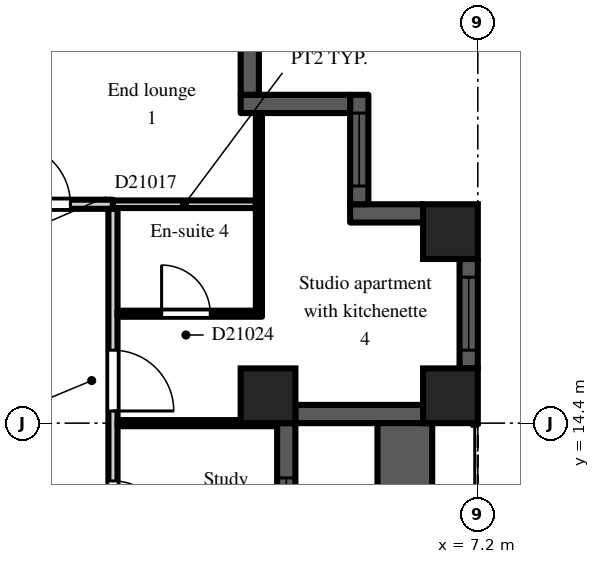
"""IFC4 building model, lengths in metres.
Left out: names, types, materials, properties, quantities, classifications, styles, units other than length and angle.
Written with IfcOpenShell. Run it as: python <this file> out.ifc"""

import sys

from ifc_helpers import new_model, si_unit, direction, frame, frame_2d, origin, origin_2d, place, context, subcontext, project, spatial, rectangle, extrude, element, fill, save


model = new_model("IFC4")
c1 = context("Model", 3, precision=1e-05, world=origin(), true_north=direction((0.0, 1.0)))
c2 = subcontext(c1, "Body", "Model", "MODEL_VIEW")
j1 = project(units=[si_unit("LENGTHUNIT", "METRE"), si_unit("PLANEANGLEUNIT", "RADIAN")], contexts=[c1])
p1 = place(None, origin())
s1 = spatial("IfcSite", under=j1, at=p1, CompositionType="ELEMENT")
p2 = place(p1, origin())
s2 = spatial("IfcBuilding", under=s1, at=p2, CompositionType="ELEMENT")
p3 = place(p2, frame((0.0, 0.0, 147.3)))
s3 = spatial("IfcBuildingStorey", under=s2, at=p3, CompositionType="ELEMENT", Elevation=147.3)
for number, where, z_axis, x_axis in (
    (1, (3.75, 14.85, 0.0), (0.0, 0.0, 1.0), (1.0, 0.0, 0.0)),
    (2, (6.75, 14.85, 0.0), (0.0, 0.0, 1.0), (1.0, 0.0, 0.0)),
    (3, (6.75, 17.55, 0.0), (0.0, 0.0, 1.0), (1.0, 0.0, 0.0)),
):
    element("IfcColumn", number, at=place(p3, frame(where, z_axis=z_axis, x_axis=x_axis)), inside=s3, PredefinedType="COLUMN", context=c2, shape_type="SweptSolid", body=[
        extrude(rectangle(XDim=0.9, YDim=0.9, at=origin_2d()), origin(), (0.0, 0.0, 1.0), 3.0),
    ])
p4 = place(p3, frame((4.05, 7.2, 0.0), z_axis=(0.0, 0.0, 1.0), x_axis=(0.0, 1.0, 0.0)))
e4 = element("IfcWall", 4, at=p4, inside=s3, PredefinedType="SOLIDWALL", context=c2, shape_type="SweptSolid", body=[
    extrude(rectangle(XDim=7.2, YDim=0.3, at=frame_2d((3.6, 0.0))), origin(), (0.0, 0.0, 1.0), 2.2),
])
p5 = place(p4, frame((3.0, 0.0, 0.0)))
e5 = element("IfcOpeningElement", 5, at=p5, cuts=e4, PredefinedType="OPENING", context=c2, shape_type="SweptSolid", body=[
    extrude(rectangle(XDim=1.2, YDim=2.05, at=frame_2d((0.6, 1.025))), frame((0.0, 0.16, 0.0), z_axis=(0.0, -1.0, 0.0), x_axis=(1.0, 0.0, 0.0)), (0.0, 0.0, 1.0), 0.32),
])
p6 = place(p4, frame((0.9, 0.0, 0.2)))
e6 = element("IfcOpeningElement", 6, at=p6, cuts=e4, PredefinedType="OPENING", context=c2, shape_type="SweptSolid", body=[
    extrude(rectangle(XDim=1.8, YDim=1.85, at=frame_2d((0.9, 0.925))), frame((0.0, 0.16, 0.0), z_axis=(0.0, -1.0, 0.0), x_axis=(1.0, 0.0, 0.0)), (0.0, 0.0, 1.0), 0.32),
])
p7 = place(p4, frame((4.5, 0.0, 0.2)))
e7 = element("IfcOpeningElement", 7, at=p7, cuts=e4, PredefinedType="OPENING", context=c2, shape_type="SweptSolid", body=[
    extrude(rectangle(XDim=1.8, YDim=1.85, at=frame_2d((0.9, 0.925))), frame((0.0, 0.16, 0.0), z_axis=(0.0, -1.0, 0.0), x_axis=(1.0, 0.0, 0.0)), (0.0, 0.0, 1.0), 0.32),
])
p8 = place(p3, frame((4.2, 14.55, 0.0), z_axis=(0.0, 0.0, 1.0), x_axis=(1.0, 0.0, 0.0)))
e8 = element("IfcWall", 8, at=p8, inside=s3, PredefinedType="SOLIDWALL", context=c2, shape_type="SweptSolid", body=[
    extrude(rectangle(XDim=2.1, YDim=0.3, at=frame_2d((1.05, 0.0))), origin(), (0.0, 0.0, 1.0), 2.2),
])
p9 = place(p3, frame((7.05, 15.3, 0.0), z_axis=(0.0, 0.0, 1.0), x_axis=(0.0, 1.0, 0.0)))
e9 = element("IfcWall", 9, at=p9, inside=s3, PredefinedType="SOLIDWALL", context=c2, shape_type="SweptSolid", body=[
    extrude(rectangle(XDim=1.8, YDim=0.3, at=frame_2d((0.9, 0.0))), origin(), (0.0, 0.0, 1.0), 2.2),
])
p10 = place(p9, frame((0.3, 0.0, 0.2)))
e10 = element("IfcOpeningElement", 10, at=p10, cuts=e9, PredefinedType="OPENING", context=c2, shape_type="SweptSolid", body=[
    extrude(rectangle(XDim=1.2, YDim=1.85, at=frame_2d((0.6, 0.925))), frame((0.0, 0.16, 0.0), z_axis=(0.0, -1.0, 0.0), x_axis=(1.0, 0.0, 0.0)), (0.0, 0.0, 1.0), 0.32),
])
p11 = place(p3, frame((6.3, 17.85, 0.0), z_axis=(0.0, 0.0, 1.0), x_axis=(-1.0, 0.0, 0.0)))
e11 = element("IfcWall", 11, at=p11, inside=s3, PredefinedType="SOLIDWALL", context=c2, shape_type="SweptSolid", body=[
    extrude(rectangle(XDim=1.2, YDim=0.3, at=frame_2d((0.6, 0.0))), origin(), (0.0, 0.0, 1.0), 2.6),
])
p12 = place(p3, frame((5.25, 18.0, 0.0), z_axis=(0.0, 0.0, 1.0), x_axis=(0.0, 1.0, 0.0)))
e12 = element("IfcWall", 12, at=p12, inside=s3, PredefinedType="SOLIDWALL", context=c2, shape_type="SweptSolid", body=[
    extrude(rectangle(XDim=1.8, YDim=0.3, at=frame_2d((0.9, 0.0))), origin(), (0.0, 0.0, 1.0), 2.6),
])
p13 = place(p12, frame((0.3, 0.0, 0.2)))
e13 = element("IfcOpeningElement", 13, at=p13, cuts=e12, PredefinedType="OPENING", context=c2, shape_type="SweptSolid", body=[
    extrude(rectangle(XDim=1.2, YDim=1.85, at=frame_2d((0.6, 0.925))), frame((0.0, 0.16, 0.0), z_axis=(0.0, -1.0, 0.0), x_axis=(1.0, 0.0, 0.0)), (0.0, 0.0, 1.0), 0.32),
])
p14 = place(p3, frame((5.1, 19.65, 0.0), z_axis=(0.0, 0.0, 1.0), x_axis=(-1.0, 0.0, 0.0)))
e14 = element("IfcWall", 14, at=p14, inside=s3, PredefinedType="SOLIDWALL", context=c2, shape_type="SweptSolid", body=[
    extrude(rectangle(XDim=1.8, YDim=0.3, at=frame_2d((0.9, 0.0))), origin(), (0.0, 0.0, 1.0), 2.6),
])
p15 = place(p3, frame((3.45, 19.8, 0.0), z_axis=(0.0, 0.0, 1.0), x_axis=(0.0, 1.0, 0.0)))
e15 = element("IfcWall", 15, at=p15, inside=s3, PredefinedType="SOLIDWALL", context=c2, shape_type="SweptSolid", body=[
    extrude(rectangle(XDim=0.9, YDim=0.3, at=frame_2d((0.45, 0.0))), origin(), (0.0, 0.0, 1.0), 2.6),
])
p16 = place(p3, frame((6.0, 7.2, 0.0), z_axis=(0.0, 0.0, 1.0), x_axis=(0.0, 1.0, 0.0)))
e16 = element("IfcWall", 16, at=p16, inside=s3, PredefinedType="PARAPET", context=c2, shape_type="SweptSolid", body=[
    extrude(rectangle(XDim=7.2, YDim=0.9, at=frame_2d((3.6, 0.0))), origin(), (0.0, 0.0, 1.0), 0.8),
])
p17 = place(p3, frame((-1.2, 18.0, 0.0), z_axis=(0.0, 0.0, 1.0), x_axis=(1.0, 0.0, 0.0)))
e17 = element("IfcWall", 17, at=p17, inside=s3, PredefinedType="PARTITIONING", context=c2, shape_type="SweptSolid", body=[
    extrude(rectangle(XDim=2.4, YDim=0.15, at=frame_2d((1.2, 0.0))), origin(), (0.0, 0.0, 1.0), 2.6),
])
p18 = place(p17, frame((0.7, 0.0, 0.0)))
e18 = element("IfcOpeningElement", 18, at=p18, cuts=e17, PredefinedType="OPENING", context=c2, shape_type="SweptSolid", body=[
    extrude(rectangle(XDim=1.0, YDim=2.1, at=frame_2d((0.5, 1.05))), frame((0.0, 0.085, 0.0), z_axis=(0.0, -1.0, 0.0), x_axis=(1.0, 0.0, 0.0)), (0.0, 0.0, 1.0), 0.17),
])
p19 = place(p3, frame((1.2, 7.125, 0.0), z_axis=(0.0, 0.0, 1.0), x_axis=(0.0, 1.0, 0.0)))
e19 = element("IfcWall", 19, at=p19, inside=s3, PredefinedType="PARTITIONING", context=c2, shape_type="SweptSolid", body=[
    extrude(rectangle(XDim=10.8, YDim=0.15, at=frame_2d((5.4, 0.0))), origin(), (0.0, 0.0, 1.0), 2.6),
])
p20 = place(p19, frame((5.425, 0.0, 0.0)))
e20 = element("IfcOpeningElement", 20, at=p20, cuts=e19, PredefinedType="OPENING", context=c2, shape_type="SweptSolid", body=[
    extrude(rectangle(XDim=0.9, YDim=2.1, at=frame_2d((0.45, 1.05))), frame((0.0, 0.085, 0.0), z_axis=(0.0, -1.0, 0.0), x_axis=(1.0, 0.0, 0.0)), (0.0, 0.0, 1.0), 0.17),
])
p21 = place(p19, frame((1.825, 0.0, 0.0)))
e21 = element("IfcOpeningElement", 21, at=p21, cuts=e19, PredefinedType="OPENING", context=c2, shape_type="SweptSolid", body=[
    extrude(rectangle(XDim=0.9, YDim=2.1, at=frame_2d((0.45, 1.05))), frame((0.0, 0.085, 0.0), z_axis=(0.0, -1.0, 0.0), x_axis=(1.0, 0.0, 0.0)), (0.0, 0.0, 1.0), 0.17),
])
p22 = place(p19, frame((7.475, 0.0, 0.0)))
e22 = element("IfcOpeningElement", 22, at=p22, cuts=e19, PredefinedType="OPENING", context=c2, shape_type="SweptSolid", body=[
    extrude(rectangle(XDim=1.0, YDim=2.1, at=frame_2d((0.5, 1.05))), frame((0.0, 0.085, 0.0), z_axis=(0.0, -1.0, 0.0), x_axis=(1.0, 0.0, 0.0)), (0.0, 0.0, 1.0), 0.17),
])
p23 = place(p3, frame((1.275, 14.4, 0.0), z_axis=(0.0, 0.0, 1.0), x_axis=(1.0, 0.0, 0.0)))
e23 = element("IfcWall", 23, at=p23, inside=s3, PredefinedType="PARTITIONING", context=c2, shape_type="SweptSolid", body=[
    extrude(rectangle(XDim=2.625, YDim=0.1, at=frame_2d((1.312, 0.0))), origin(), (0.0, 0.0, 1.0), 2.6),
])
p24 = place(p3, frame((1.275, 16.2, 0.0), z_axis=(0.0, 0.0, 1.0), x_axis=(1.0, 0.0, 0.0)))
e24 = element("IfcWall", 24, at=p24, inside=s3, PredefinedType="PARTITIONING", context=c2, shape_type="SweptSolid", body=[
    extrude(rectangle(XDim=2.375, YDim=0.1, at=frame_2d((1.188, 0.0))), origin(), (0.0, 0.0, 1.0), 2.6),
])
p25 = place(p24, frame((0.725, 0.0, 0.0)))
e25 = element("IfcOpeningElement", 25, at=p25, cuts=e24, PredefinedType="OPENING", context=c2, shape_type="SweptSolid", body=[
    extrude(rectangle(XDim=0.8, YDim=2.1, at=frame_2d((0.4, 1.05))), frame((0.0, 0.06, 0.0), z_axis=(0.0, -1.0, 0.0), x_axis=(1.0, 0.0, 0.0)), (0.0, 0.0, 1.0), 0.12),
])
p26 = place(p3, frame((1.2, 18.0, 0.0), z_axis=(0.0, 0.0, 1.0), x_axis=(1.0, 0.0, 0.0)))
e26 = element("IfcWall", 26, at=p26, inside=s3, PredefinedType="PARTITIONING", context=c2, shape_type="SweptSolid", body=[
    extrude(rectangle(XDim=2.35, YDim=0.125, at=frame_2d((1.175, 0.0))), origin(), (0.0, 0.0, 1.0), 2.6),
])
p27 = place(p3, frame((3.6, 16.25, 0.0), z_axis=(0.0, 0.0, 1.0), x_axis=(0.0, 1.0, 0.0)))
e27 = element("IfcWall", 27, at=p27, inside=s3, PredefinedType="PARTITIONING", context=c2, shape_type="SweptSolid", body=[
    extrude(rectangle(XDim=3.25, YDim=0.1, at=frame_2d((1.625, 0.0))), origin(), (0.0, 0.0, 1.0), 2.6),
])
p28 = place(p7, origin())
e28 = element("IfcWindow", 28, at=p28, inside=s3, PartitioningType="SINGLE_PANEL", PredefinedType="WINDOW", context=c2, shape_type="SweptSolid", body=[
    extrude(rectangle(XDim=1.8, YDim=1.85, at=frame_2d((0.9, 0.925))), frame((0.0, 0.03, 0.0), z_axis=(0.0, -1.0, 0.0), x_axis=(1.0, 0.0, 0.0)), (0.0, 0.0, 1.0), 0.06),
])
fill(e7, e28)
p29 = place(p10, origin())
e29 = element("IfcWindow", 29, at=p29, inside=s3, PartitioningType="SINGLE_PANEL", PredefinedType="WINDOW", context=c2, shape_type="SweptSolid", body=[
    extrude(rectangle(XDim=1.2, YDim=1.85, at=frame_2d((0.6, 0.925))), frame((0.0, 0.03, 0.0), z_axis=(0.0, -1.0, 0.0), x_axis=(1.0, 0.0, 0.0)), (0.0, 0.0, 1.0), 0.06),
])
fill(e10, e29)
p30 = place(p13, origin())
e30 = element("IfcWindow", 30, at=p30, inside=s3, PartitioningType="SINGLE_PANEL", PredefinedType="WINDOW", context=c2, shape_type="SweptSolid", body=[
    extrude(rectangle(XDim=1.2, YDim=1.85, at=frame_2d((0.6, 0.925))), frame((0.0, 0.03, 0.0), z_axis=(0.0, -1.0, 0.0), x_axis=(1.0, 0.0, 0.0)), (0.0, 0.0, 1.0), 0.06),
])
fill(e13, e30)
p31 = place(p18, origin())
e31 = element("IfcDoor", 31, at=p31, inside=s3, OperationType="SINGLE_SWING_LEFT", PredefinedType="DOOR", context=c2, shape_type="SweptSolid", body=[
    extrude(rectangle(XDim=1.0, YDim=2.1, at=frame_2d((0.5, 1.05))), frame((0.0, 0.025, 0.0), z_axis=(0.0, -1.0, 0.0), x_axis=(1.0, 0.0, 0.0)), (0.0, 0.0, 1.0), 0.05),
])
fill(e18, e31)
p32 = place(p20, frame((0.9, 0.0, 0.0), z_axis=(0.0, 0.0, 1.0), x_axis=(-1.0, 0.0, 0.0)))
e32 = element("IfcDoor", 32, at=p32, inside=s3, OperationType="SINGLE_SWING_RIGHT", PredefinedType="DOOR", context=c2, shape_type="SweptSolid", body=[
    extrude(rectangle(XDim=0.9, YDim=2.1, at=frame_2d((0.45, 1.05))), frame((0.0, 0.025, 0.0), z_axis=(0.0, -1.0, 0.0), x_axis=(1.0, 0.0, 0.0)), (0.0, 0.0, 1.0), 0.05),
])
fill(e20, e32)
p33 = place(p25, origin())
e33 = element("IfcDoor", 33, at=p33, inside=s3, OperationType="SINGLE_SWING_LEFT", PredefinedType="DOOR", context=c2, shape_type="SweptSolid", body=[
    extrude(rectangle(XDim=0.8, YDim=2.1, at=frame_2d((0.4, 1.05))), frame((0.0, 0.025, 0.0), z_axis=(0.0, -1.0, 0.0), x_axis=(1.0, 0.0, 0.0)), (0.0, 0.0, 1.0), 0.05),
])
fill(e25, e33)
p34 = place(p22, frame((1.0, 0.0, 0.0), z_axis=(0.0, 0.0, 1.0), x_axis=(-1.0, 0.0, 0.0)))
e34 = element("IfcDoor", 34, at=p34, inside=s3, OperationType="SINGLE_SWING_RIGHT", PredefinedType="DOOR", context=c2, shape_type="SweptSolid", body=[
    extrude(rectangle(XDim=1.0, YDim=2.1, at=frame_2d((0.5, 1.05))), frame((0.0, 0.025, 0.0), z_axis=(0.0, -1.0, 0.0), x_axis=(1.0, 0.0, 0.0)), (0.0, 0.0, 1.0), 0.05),
])
fill(e22, e34)
save(model, sys.argv[1])
